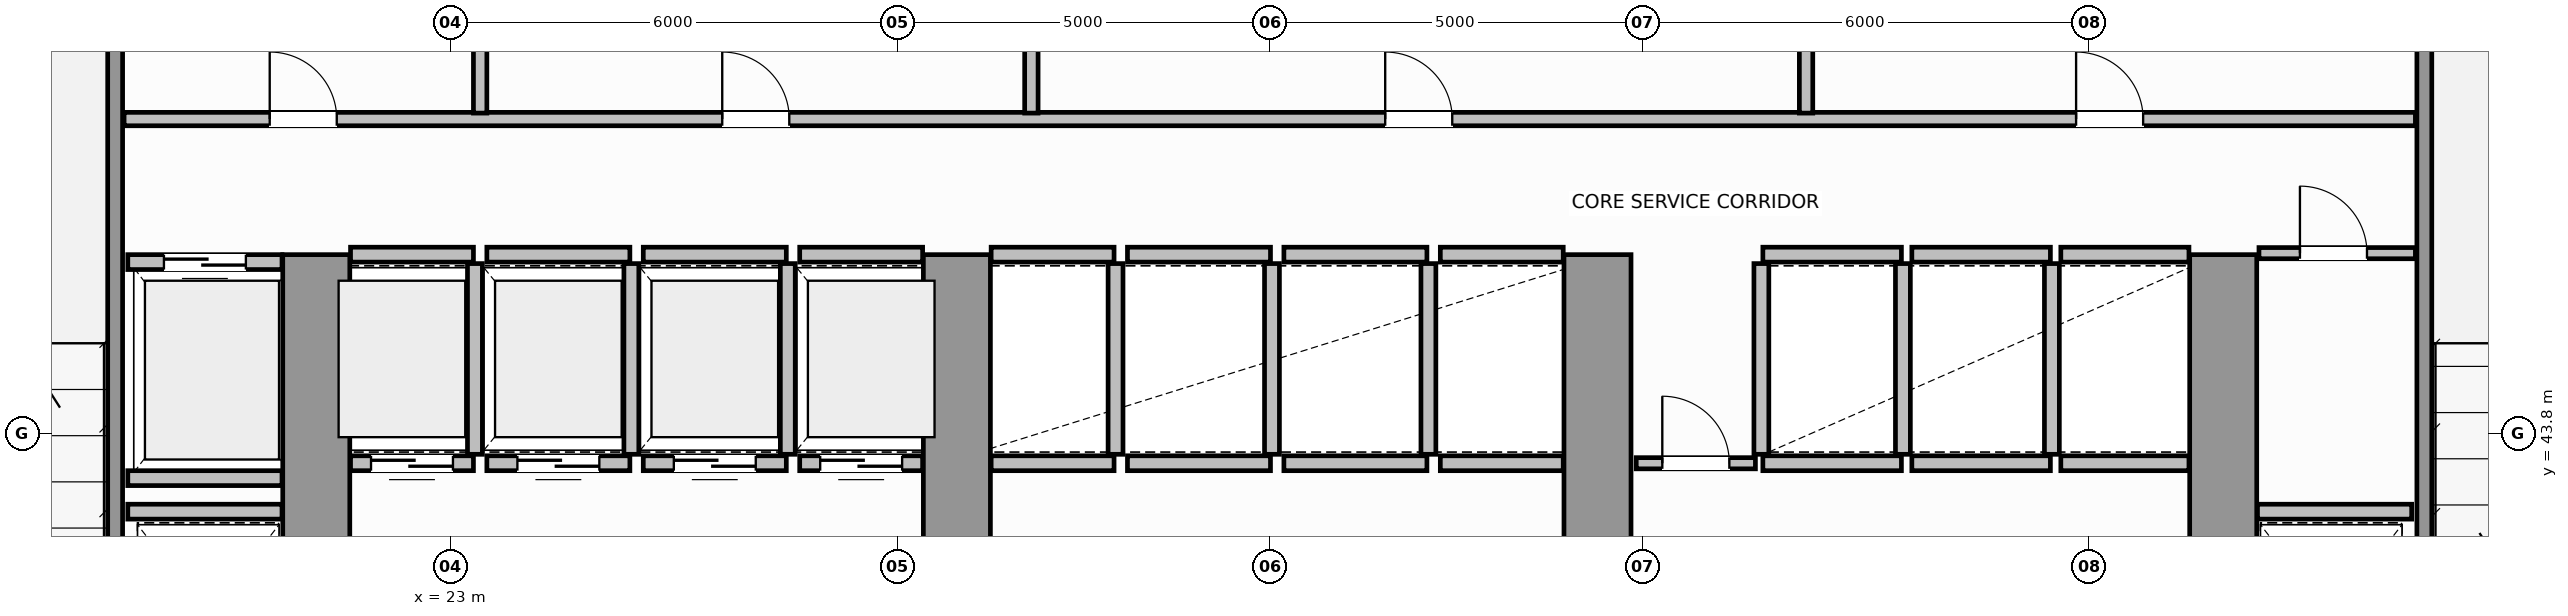
"""IFC4 building model, lengths in metres.
Left out: names, types, materials, properties, quantities, classifications, styles, units other than length and angle.
Written with IfcOpenShell. Run it as: python <this file> out.ifc"""

import sys

from ifc_helpers import new_model, si_unit, direction, frame, frame_2d, origin, place, context, subcontext, project, spatial, rectangle, extrude, source, transform, mapped, element, fill, save


model = new_model("IFC4")
c1 = context("Model", 3, precision=1e-05, world=origin(), true_north=direction((0.0, 1.0)))
c2 = subcontext(c1, "Body", "Model", "MODEL_VIEW")
j1 = project(units=[si_unit("LENGTHUNIT", "METRE"), si_unit("PLANEANGLEUNIT", "RADIAN")], contexts=[c1])
p1 = place(None, origin())
s1 = spatial("IfcSite", under=j1, at=p1, CompositionType="ELEMENT")
p2 = place(p1, origin())
s2 = spatial("IfcBuilding", under=s1, at=p2, CompositionType="ELEMENT")
p3 = place(p2, frame((0.0, 0.0, 68.2)))
s3 = spatial("IfcBuildingStorey", under=s2, at=p3, CompositionType="ELEMENT", Elevation=68.2)
for number, where, z_axis, x_axis in (
    (1, (21.2, 36.97, 0.0), (0.0, 0.0, 1.0), (0.0, 1.0, 0.0)),
    (2, (29.8, 36.97, 0.0), (0.0, 0.0, 1.0), (0.0, 1.0, 0.0)),
    (3, (38.4, 36.97, 0.0), (0.0, 0.0, 1.0), (0.0, 1.0, 0.0)),
    (4, (46.8, 36.97, 0.0), (0.0, 0.0, 1.0), (0.0, 1.0, 0.0)),
):
    element("IfcWall", number, at=place(p3, frame(where, z_axis=z_axis, x_axis=x_axis)), inside=s3, PredefinedType="SHEAR", context=c2, shape_type="SweptSolid", body=[
        extrude(rectangle(XDim=9.23, YDim=0.9, at=frame_2d((4.615, 0.0))), origin(), (0.0, 0.0, 1.0), 3.8),
    ])
for number, where, z_axis, x_axis in (
    (5, (18.5, 39.96, 0.0), (0.0, 0.0, 1.0), (0.0, 1.0, 0.0)),
    (6, (49.5, 39.96, 0.0), (0.0, 0.0, 1.0), (0.0, 1.0, 0.0)),
):
    element("IfcWall", number, at=place(p3, frame(where, z_axis=z_axis, x_axis=x_axis)), inside=s3, PredefinedType="SOLIDWALL", context=c2, shape_type="SweptSolid", body=[
        extrude(rectangle(XDim=9.93, YDim=0.2, at=frame_2d((4.965, 0.0))), origin(), (0.0, 0.0, 1.0), 3.8),
    ])
p4 = place(p3, frame((21.66, 43.4, 0.0), z_axis=(0.0, 0.0, 1.0), x_axis=(1.0, 0.0, 0.0)))
e7 = element("IfcWall", 7, at=p4, inside=s3, PredefinedType="SOLIDWALL", context=c2, shape_type="SweptSolid", body=[
    extrude(rectangle(XDim=1.65, YDim=0.2, at=frame_2d((0.825, 0.0))), origin(), (0.0, 0.0, 1.0), 3.58),
])
p5 = place(p4, frame((0.275, 0.0, 0.0)))
e8 = element("IfcOpeningElement", 8, at=p5, cuts=e7, PredefinedType="OPENING", context=c2, shape_type="SweptSolid", body=[
    extrude(rectangle(XDim=1.1, YDim=2.15, at=frame_2d((0.55, 1.075))), frame((0.0, 0.11, 0.0), z_axis=(0.0, -1.0, 0.0), x_axis=(1.0, 0.0, 0.0)), (0.0, 0.0, 1.0), 0.22),
])
p6 = place(p3, frame((21.66, 46.2, 0.0), z_axis=(0.0, 0.0, 1.0), x_axis=(1.0, 0.0, 0.0)))
e9 = element("IfcWall", 9, at=p6, inside=s3, PredefinedType="SOLIDWALL", context=c2, shape_type="SweptSolid", body=[
    extrude(rectangle(XDim=1.65, YDim=0.2, at=frame_2d((0.825, 0.0))), origin(), (0.0, 0.0, 1.0), 3.58),
])
p7 = place(p3, frame((23.33, 43.52, 0.0), z_axis=(0.0, 0.0, 1.0), x_axis=(0.0, 1.0, 0.0)))
e10 = element("IfcWall", 10, at=p7, inside=s3, PredefinedType="SOLIDWALL", context=c2, shape_type="SweptSolid", body=[
    extrude(rectangle(XDim=2.56, YDim=0.2, at=frame_2d((1.28, 0.0))), origin(), (0.0, 0.0, 1.0), 3.58),
])
p8 = place(p3, frame((23.49, 43.4, 0.0), z_axis=(0.0, 0.0, 1.0), x_axis=(1.0, 0.0, 0.0)))
e11 = element("IfcWall", 11, at=p8, inside=s3, PredefinedType="SOLIDWALL", context=c2, shape_type="SweptSolid", body=[
    extrude(rectangle(XDim=1.92, YDim=0.2, at=frame_2d((0.96, 0.0))), origin(), (0.0, 0.0, 1.0), 3.58),
])
p9 = place(p8, frame((0.41, 0.0, 0.0)))
e12 = element("IfcOpeningElement", 12, at=p9, cuts=e11, PredefinedType="OPENING", context=c2, shape_type="SweptSolid", body=[
    extrude(rectangle(XDim=1.1, YDim=2.15, at=frame_2d((0.55, 1.075))), frame((0.0, 0.11, 0.0), z_axis=(0.0, -1.0, 0.0), x_axis=(1.0, 0.0, 0.0)), (0.0, 0.0, 1.0), 0.22),
])
p10 = place(p3, frame((23.49, 46.2, 0.0), z_axis=(0.0, 0.0, 1.0), x_axis=(1.0, 0.0, 0.0)))
e13 = element("IfcWall", 13, at=p10, inside=s3, PredefinedType="SOLIDWALL", context=c2, shape_type="SweptSolid", body=[
    extrude(rectangle(XDim=1.92, YDim=0.2, at=frame_2d((0.96, 0.0))), origin(), (0.0, 0.0, 1.0), 3.58),
])
p11 = place(p3, frame((25.43, 43.52, 0.0), z_axis=(0.0, 0.0, 1.0), x_axis=(0.0, 1.0, 0.0)))
e14 = element("IfcWall", 14, at=p11, inside=s3, PredefinedType="SOLIDWALL", context=c2, shape_type="SweptSolid", body=[
    extrude(rectangle(XDim=2.56, YDim=0.2, at=frame_2d((1.28, 0.0))), origin(), (0.0, 0.0, 1.0), 3.58),
])
p12 = place(p3, frame((25.59, 43.4, 0.0), z_axis=(0.0, 0.0, 1.0), x_axis=(1.0, 0.0, 0.0)))
e15 = element("IfcWall", 15, at=p12, inside=s3, PredefinedType="SOLIDWALL", context=c2, shape_type="SweptSolid", body=[
    extrude(rectangle(XDim=1.92, YDim=0.2, at=frame_2d((0.96, 0.0))), origin(), (0.0, 0.0, 1.0), 3.58),
])
p13 = place(p12, frame((0.41, 0.0, 0.0)))
e16 = element("IfcOpeningElement", 16, at=p13, cuts=e15, PredefinedType="OPENING", context=c2, shape_type="SweptSolid", body=[
    extrude(rectangle(XDim=1.1, YDim=2.15, at=frame_2d((0.55, 1.075))), frame((0.0, 0.11, 0.0), z_axis=(0.0, -1.0, 0.0), x_axis=(1.0, 0.0, 0.0)), (0.0, 0.0, 1.0), 0.22),
])
p14 = place(p3, frame((25.59, 46.2, 0.0), z_axis=(0.0, 0.0, 1.0), x_axis=(1.0, 0.0, 0.0)))
e17 = element("IfcWall", 17, at=p14, inside=s3, PredefinedType="SOLIDWALL", context=c2, shape_type="SweptSolid", body=[
    extrude(rectangle(XDim=1.92, YDim=0.2, at=frame_2d((0.96, 0.0))), origin(), (0.0, 0.0, 1.0), 3.58),
])
p15 = place(p3, frame((27.53, 43.52, 0.0), z_axis=(0.0, 0.0, 1.0), x_axis=(0.0, 1.0, 0.0)))
e18 = element("IfcWall", 18, at=p15, inside=s3, PredefinedType="SOLIDWALL", context=c2, shape_type="SweptSolid", body=[
    extrude(rectangle(XDim=2.56, YDim=0.2, at=frame_2d((1.28, 0.0))), origin(), (0.0, 0.0, 1.0), 3.58),
])
p16 = place(p3, frame((27.69, 43.4, 0.0), z_axis=(0.0, 0.0, 1.0), x_axis=(1.0, 0.0, 0.0)))
e19 = element("IfcWall", 19, at=p16, inside=s3, PredefinedType="SOLIDWALL", context=c2, shape_type="SweptSolid", body=[
    extrude(rectangle(XDim=1.65, YDim=0.2, at=frame_2d((0.825, 0.0))), origin(), (0.0, 0.0, 1.0), 3.58),
])
p17 = place(p16, frame((0.275, 0.0, 0.0)))
e20 = element("IfcOpeningElement", 20, at=p17, cuts=e19, PredefinedType="OPENING", context=c2, shape_type="SweptSolid", body=[
    extrude(rectangle(XDim=1.1, YDim=2.15, at=frame_2d((0.55, 1.075))), frame((0.0, 0.11, 0.0), z_axis=(0.0, -1.0, 0.0), x_axis=(1.0, 0.0, 0.0)), (0.0, 0.0, 1.0), 0.22),
])
p18 = place(p3, frame((27.69, 46.2, 0.0), z_axis=(0.0, 0.0, 1.0), x_axis=(1.0, 0.0, 0.0)))
e21 = element("IfcWall", 21, at=p18, inside=s3, PredefinedType="SOLIDWALL", context=c2, shape_type="SweptSolid", body=[
    extrude(rectangle(XDim=1.65, YDim=0.2, at=frame_2d((0.825, 0.0))), origin(), (0.0, 0.0, 1.0), 3.58),
])
for number, where, z_axis, x_axis in (
    (22, (30.26, 43.4, 0.0), (0.0, 0.0, 1.0), (1.0, 0.0, 0.0)),
    (23, (30.26, 46.2, 0.0), (0.0, 0.0, 1.0), (1.0, 0.0, 0.0)),
):
    element("IfcWall", number, at=place(p3, frame(where, z_axis=z_axis, x_axis=x_axis)), inside=s3, PredefinedType="SOLIDWALL", context=c2, shape_type="SweptSolid", body=[
        extrude(rectangle(XDim=1.65, YDim=0.2, at=frame_2d((0.825, 0.0))), origin(), (0.0, 0.0, 1.0), 3.58),
    ])
p19 = place(p3, frame((31.93, 43.52, 0.0), z_axis=(0.0, 0.0, 1.0), x_axis=(0.0, 1.0, 0.0)))
e24 = element("IfcWall", 24, at=p19, inside=s3, PredefinedType="SOLIDWALL", context=c2, shape_type="SweptSolid", body=[
    extrude(rectangle(XDim=2.56, YDim=0.2, at=frame_2d((1.28, 0.0))), origin(), (0.0, 0.0, 1.0), 3.58),
])
for number, where, z_axis, x_axis in (
    (25, (32.09, 43.4, 0.0), (0.0, 0.0, 1.0), (1.0, 0.0, 0.0)),
    (26, (32.09, 46.2, 0.0), (0.0, 0.0, 1.0), (1.0, 0.0, 0.0)),
):
    element("IfcWall", number, at=place(p3, frame(where, z_axis=z_axis, x_axis=x_axis)), inside=s3, PredefinedType="SOLIDWALL", context=c2, shape_type="SweptSolid", body=[
        extrude(rectangle(XDim=1.92, YDim=0.2, at=frame_2d((0.96, 0.0))), origin(), (0.0, 0.0, 1.0), 3.58),
    ])
p20 = place(p3, frame((34.03, 43.52, 0.0), z_axis=(0.0, 0.0, 1.0), x_axis=(0.0, 1.0, 0.0)))
e27 = element("IfcWall", 27, at=p20, inside=s3, PredefinedType="SOLIDWALL", context=c2, shape_type="SweptSolid", body=[
    extrude(rectangle(XDim=2.56, YDim=0.2, at=frame_2d((1.28, 0.0))), origin(), (0.0, 0.0, 1.0), 3.58),
])
for number, where, z_axis, x_axis in (
    (28, (34.19, 43.4, 0.0), (0.0, 0.0, 1.0), (1.0, 0.0, 0.0)),
    (29, (34.19, 46.2, 0.0), (0.0, 0.0, 1.0), (1.0, 0.0, 0.0)),
):
    element("IfcWall", number, at=place(p3, frame(where, z_axis=z_axis, x_axis=x_axis)), inside=s3, PredefinedType="SOLIDWALL", context=c2, shape_type="SweptSolid", body=[
        extrude(rectangle(XDim=1.92, YDim=0.2, at=frame_2d((0.96, 0.0))), origin(), (0.0, 0.0, 1.0), 3.58),
    ])
p21 = place(p3, frame((36.13, 43.52, 0.0), z_axis=(0.0, 0.0, 1.0), x_axis=(0.0, 1.0, 0.0)))
e30 = element("IfcWall", 30, at=p21, inside=s3, PredefinedType="SOLIDWALL", context=c2, shape_type="SweptSolid", body=[
    extrude(rectangle(XDim=2.56, YDim=0.2, at=frame_2d((1.28, 0.0))), origin(), (0.0, 0.0, 1.0), 3.58),
])
for number, where, z_axis, x_axis in (
    (31, (36.29, 43.4, 0.0), (0.0, 0.0, 1.0), (1.0, 0.0, 0.0)),
    (32, (36.29, 46.2, 0.0), (0.0, 0.0, 1.0), (1.0, 0.0, 0.0)),
):
    element("IfcWall", number, at=place(p3, frame(where, z_axis=z_axis, x_axis=x_axis)), inside=s3, PredefinedType="SOLIDWALL", context=c2, shape_type="SweptSolid", body=[
        extrude(rectangle(XDim=1.65, YDim=0.2, at=frame_2d((0.825, 0.0))), origin(), (0.0, 0.0, 1.0), 3.58),
    ])
for number, where, z_axis, x_axis in (
    (33, (40.62, 43.4, 0.0), (0.0, 0.0, 1.0), (1.0, 0.0, 0.0)),
    (34, (40.62, 46.2, 0.0), (0.0, 0.0, 1.0), (1.0, 0.0, 0.0)),
):
    element("IfcWall", number, at=place(p3, frame(where, z_axis=z_axis, x_axis=x_axis)), inside=s3, PredefinedType="SOLIDWALL", context=c2, shape_type="SweptSolid", body=[
        extrude(rectangle(XDim=1.86, YDim=0.2, at=frame_2d((0.93, 0.0))), origin(), (0.0, 0.0, 1.0), 3.58),
    ])
for number, where, z_axis, x_axis in (
    (35, (40.6, 43.52, 0.0), (0.0, 0.0, 1.0), (0.0, 1.0, 0.0)),
    (36, (42.5, 43.52, 0.0), (0.0, 0.0, 1.0), (0.0, 1.0, 0.0)),
):
    element("IfcWall", number, at=place(p3, frame(where, z_axis=z_axis, x_axis=x_axis)), inside=s3, PredefinedType="SOLIDWALL", context=c2, shape_type="SweptSolid", body=[
        extrude(rectangle(XDim=2.56, YDim=0.2, at=frame_2d((1.28, 0.0))), origin(), (0.0, 0.0, 1.0), 3.58),
    ])
for number, where, z_axis, x_axis in (
    (37, (42.62, 43.4, 0.0), (0.0, 0.0, 1.0), (1.0, 0.0, 0.0)),
    (38, (42.62, 46.2, 0.0), (0.0, 0.0, 1.0), (1.0, 0.0, 0.0)),
):
    element("IfcWall", number, at=place(p3, frame(where, z_axis=z_axis, x_axis=x_axis)), inside=s3, PredefinedType="SOLIDWALL", context=c2, shape_type="SweptSolid", body=[
        extrude(rectangle(XDim=1.86, YDim=0.2, at=frame_2d((0.93, 0.0))), origin(), (0.0, 0.0, 1.0), 3.58),
    ])
p22 = place(p3, frame((44.5, 43.52, 0.0), z_axis=(0.0, 0.0, 1.0), x_axis=(0.0, 1.0, 0.0)))
e39 = element("IfcWall", 39, at=p22, inside=s3, PredefinedType="SOLIDWALL", context=c2, shape_type="SweptSolid", body=[
    extrude(rectangle(XDim=2.56, YDim=0.2, at=frame_2d((1.28, 0.0))), origin(), (0.0, 0.0, 1.0), 3.58),
])
for number, where, z_axis, x_axis in (
    (40, (44.62, 43.4, 0.0), (0.0, 0.0, 1.0), (1.0, 0.0, 0.0)),
    (41, (44.62, 46.2, 0.0), (0.0, 0.0, 1.0), (1.0, 0.0, 0.0)),
):
    element("IfcWall", number, at=place(p3, frame(where, z_axis=z_axis, x_axis=x_axis)), inside=s3, PredefinedType="SOLIDWALL", context=c2, shape_type="SweptSolid", body=[
        extrude(rectangle(XDim=1.72, YDim=0.2, at=frame_2d((0.86, 0.0))), origin(), (0.0, 0.0, 1.0), 3.58),
    ])
p23 = place(p3, frame((18.67, 46.1, 0.0), z_axis=(0.0, 0.0, 1.0), x_axis=(1.0, 0.0, 0.0)))
e42 = element("IfcWall", 42, at=p23, inside=s3, PredefinedType="SOLIDWALL", context=c2, shape_type="SweptSolid", body=[
    extrude(rectangle(XDim=2.07, YDim=0.2, at=frame_2d((1.035, 0.0))), origin(), (0.0, 0.0, 1.0), 3.58),
])
p24 = place(p23, frame((0.485, 0.0, 0.0)))
e43 = element("IfcOpeningElement", 43, at=p24, cuts=e42, PredefinedType="OPENING", context=c2, shape_type="SweptSolid", body=[
    extrude(rectangle(XDim=1.1, YDim=2.15, at=frame_2d((0.55, 1.075))), frame((0.0, 0.11, 0.0), z_axis=(0.0, -1.0, 0.0), x_axis=(1.0, 0.0, 0.0)), (0.0, 0.0, 1.0), 0.22),
])
for number, where, z_axis, x_axis in (
    (44, (18.67, 43.2, 0.0), (0.0, 0.0, 1.0), (1.0, 0.0, 0.0)),
    (45, (18.67, 42.75, 0.0), (0.0, 0.0, 1.0), (1.0, 0.0, 0.0)),
    (46, (47.26, 42.75, 0.0), (0.0, 0.0, 1.0), (1.0, 0.0, 0.0)),
):
    element("IfcWall", number, at=place(p3, frame(where, z_axis=z_axis, x_axis=x_axis)), inside=s3, PredefinedType="SOLIDWALL", context=c2, shape_type="SweptSolid", body=[
        extrude(rectangle(XDim=2.07, YDim=0.2, at=frame_2d((1.035, 0.0))), origin(), (0.0, 0.0, 1.0), 3.58),
    ])
p25 = place(p3, frame((47.28, 46.22, 0.0), z_axis=(0.0, 0.0, 1.0), x_axis=(1.0, 0.0, 0.0)))
e47 = element("IfcWall", 47, at=p25, inside=s3, PredefinedType="PARTITIONING", context=c2, shape_type="SweptSolid", body=[
    extrude(rectangle(XDim=2.1, YDim=0.15, at=frame_2d((1.05, 0.0))), origin(), (0.0, 0.0, 1.0), 3.58),
])
p26 = place(p25, frame((0.55, 0.0, 0.0)))
e48 = element("IfcOpeningElement", 48, at=p26, cuts=e47, PredefinedType="OPENING", context=c2, shape_type="SweptSolid", body=[
    extrude(rectangle(XDim=0.9, YDim=2.1, at=frame_2d((0.45, 1.05))), frame((0.0, 0.085, 0.0), z_axis=(0.0, -1.0, 0.0), x_axis=(1.0, 0.0, 0.0)), (0.0, 0.0, 1.0), 0.17),
])
p27 = place(p3, frame((38.92, 43.4, 0.0), z_axis=(0.0, 0.0, 1.0), x_axis=(1.0, 0.0, 0.0)))
e49 = element("IfcWall", 49, at=p27, inside=s3, PredefinedType="PARTITIONING", context=c2, shape_type="SweptSolid", body=[
    extrude(rectangle(XDim=1.6, YDim=0.15, at=frame_2d((0.8, 0.0))), origin(), (0.0, 0.0, 1.0), 3.58),
])
p28 = place(p27, frame((0.35, 0.0, 0.0)))
e50 = element("IfcOpeningElement", 50, at=p28, cuts=e49, PredefinedType="OPENING", context=c2, shape_type="SweptSolid", body=[
    extrude(rectangle(XDim=0.9, YDim=2.1, at=frame_2d((0.45, 1.05))), frame((0.0, 0.085, 0.0), z_axis=(0.0, -1.0, 0.0), x_axis=(1.0, 0.0, 0.0)), (0.0, 0.0, 1.0), 0.17),
])
p29 = place(p3, frame((18.62, 48.02, 0.0), z_axis=(0.0, 0.0, 1.0), x_axis=(1.0, 0.0, 0.0)))
e51 = element("IfcWall", 51, at=p29, inside=s3, PredefinedType="PLUMBINGWALL", context=c2, shape_type="SweptSolid", body=[
    extrude(rectangle(XDim=30.76, YDim=0.18, at=frame_2d((15.38, 0.0))), origin(), (0.0, 0.0, 1.0), 3.58),
])
p30 = place(p29, frame((1.955, 0.0, 0.0)))
e52 = element("IfcOpeningElement", 52, at=p30, cuts=e51, PredefinedType="OPENING", context=c2, shape_type="SweptSolid", body=[
    extrude(rectangle(XDim=0.9, YDim=2.15, at=frame_2d((0.45, 1.075))), frame((0.0, 0.1, 0.0), z_axis=(0.0, -1.0, 0.0), x_axis=(1.0, 0.0, 0.0)), (0.0, 0.0, 1.0), 0.2),
])
p31 = place(p29, frame((8.03, 0.0, 0.0)))
e53 = element("IfcOpeningElement", 53, at=p31, cuts=e51, PredefinedType="OPENING", context=c2, shape_type="SweptSolid", body=[
    extrude(rectangle(XDim=0.9, YDim=2.15, at=frame_2d((0.45, 1.075))), frame((0.0, 0.1, 0.0), z_axis=(0.0, -1.0, 0.0), x_axis=(1.0, 0.0, 0.0)), (0.0, 0.0, 1.0), 0.2),
])
p32 = place(p29, frame((16.93, 0.0, 0.0)))
e54 = element("IfcOpeningElement", 54, at=p32, cuts=e51, PredefinedType="OPENING", context=c2, shape_type="SweptSolid", body=[
    extrude(rectangle(XDim=0.9, YDim=2.15, at=frame_2d((0.45, 1.075))), frame((0.0, 0.1, 0.0), z_axis=(0.0, -1.0, 0.0), x_axis=(1.0, 0.0, 0.0)), (0.0, 0.0, 1.0), 0.2),
])
p33 = place(p29, frame((26.205, 0.0, 0.0)))
e55 = element("IfcOpeningElement", 55, at=p33, cuts=e51, PredefinedType="OPENING", context=c2, shape_type="SweptSolid", body=[
    extrude(rectangle(XDim=0.9, YDim=2.15, at=frame_2d((0.45, 1.075))), frame((0.0, 0.1, 0.0), z_axis=(0.0, -1.0, 0.0), x_axis=(1.0, 0.0, 0.0)), (0.0, 0.0, 1.0), 0.2),
])
for number, where, z_axis, x_axis in (
    (56, (23.4, 48.1, 0.0), (0.0, 0.0, 1.0), (0.0, 1.0, 0.0)),
    (57, (30.8, 48.1, 0.0), (0.0, 0.0, 1.0), (0.0, 1.0, 0.0)),
    (58, (41.2, 48.1, 0.0), (0.0, 0.0, 1.0), (0.0, 1.0, 0.0)),
):
    element("IfcWall", number, at=place(p3, frame(where, z_axis=z_axis, x_axis=x_axis)), inside=s3, PredefinedType="PLUMBINGWALL", context=c2, shape_type="SweptSolid", body=[
        extrude(rectangle(XDim=1.98, YDim=0.18, at=frame_2d((0.99, 0.0))), origin(), (0.0, 0.0, 1.0), 3.58),
    ])
m1 = source(origin(), c2, "Body", "SweptSolid", [
    extrude(rectangle(XDim=1.1, YDim=2.15, at=frame_2d((0.55, 1.075))), frame((0.0, 0.025, 0.0), z_axis=(0.0, -1.0, 0.0), x_axis=(1.0, 0.0, 0.0)), (0.0, 0.0, 1.0), 0.05),
])
p34 = place(p5, origin())
e59 = element("IfcDoor", 59, at=p34, inside=s3, OperationType="DOUBLE_DOOR_SLIDING", PredefinedType="DOOR", context=c2, shape_type="MappedRepresentation", body=[
    mapped(m1, transform((0.0, 0.0, 0.0), scale=1.0)),
])
fill(e8, e59)
p35 = place(p9, origin())
e60 = element("IfcDoor", 60, at=p35, inside=s3, OperationType="DOUBLE_DOOR_SLIDING", PredefinedType="DOOR", context=c2, shape_type="MappedRepresentation", body=[
    mapped(m1, transform((0.0, 0.0, 0.0), scale=1.0)),
])
fill(e12, e60)
p36 = place(p13, origin())
e61 = element("IfcDoor", 61, at=p36, inside=s3, OperationType="DOUBLE_DOOR_SLIDING", PredefinedType="DOOR", context=c2, shape_type="MappedRepresentation", body=[
    mapped(m1, transform((0.0, 0.0, 0.0), scale=1.0)),
])
fill(e16, e61)
p37 = place(p17, origin())
e62 = element("IfcDoor", 62, at=p37, inside=s3, OperationType="DOUBLE_DOOR_SLIDING", PredefinedType="DOOR", context=c2, shape_type="MappedRepresentation", body=[
    mapped(m1, transform((0.0, 0.0, 0.0), scale=1.0)),
])
fill(e20, e62)
p38 = place(p24, origin())
e63 = element("IfcDoor", 63, at=p38, inside=s3, OperationType="DOUBLE_DOOR_SLIDING", PredefinedType="DOOR", context=c2, shape_type="MappedRepresentation", body=[
    mapped(m1, transform((0.0, 0.0, 0.0), scale=1.0)),
])
fill(e43, e63)
m2 = source(origin(), c2, "Body", "SweptSolid", [
    extrude(rectangle(XDim=0.9, YDim=2.1, at=frame_2d((0.45, 1.05))), frame((0.0, 0.025, 0.0), z_axis=(0.0, -1.0, 0.0), x_axis=(1.0, 0.0, 0.0)), (0.0, 0.0, 1.0), 0.05),
])
p39 = place(p26, origin())
e64 = element("IfcDoor", 64, at=p39, inside=s3, OperationType="SINGLE_SWING_RIGHT", PredefinedType="DOOR", context=c2, shape_type="MappedRepresentation", body=[
    mapped(m2, transform((0.0, 0.0, 0.0), scale=1.0)),
])
fill(e48, e64)
p40 = place(p28, origin())
e65 = element("IfcDoor", 65, at=p40, inside=s3, OperationType="SINGLE_SWING_LEFT", PredefinedType="DOOR", context=c2, shape_type="MappedRepresentation", body=[
    mapped(m2, transform((0.0, 0.0, 0.0), scale=1.0)),
])
fill(e50, e65)
m3 = source(origin(), c2, "Body", "SweptSolid", [
    extrude(rectangle(XDim=0.9, YDim=2.15, at=frame_2d((0.45, 1.075))), frame((0.0, 0.025, 0.0), z_axis=(0.0, -1.0, 0.0), x_axis=(1.0, 0.0, 0.0)), (0.0, 0.0, 1.0), 0.05),
])
p41 = place(p30, origin())
e66 = element("IfcDoor", 66, at=p41, inside=s3, OperationType="SINGLE_SWING_LEFT", PredefinedType="DOOR", context=c2, shape_type="MappedRepresentation", body=[
    mapped(m3, transform((0.0, 0.0, 0.0), scale=1.0)),
])
fill(e52, e66)
p42 = place(p31, origin())
e67 = element("IfcDoor", 67, at=p42, inside=s3, OperationType="SINGLE_SWING_RIGHT", PredefinedType="DOOR", context=c2, shape_type="MappedRepresentation", body=[
    mapped(m3, transform((0.0, 0.0, 0.0), scale=1.0)),
])
fill(e53, e67)
p43 = place(p32, origin())
e68 = element("IfcDoor", 68, at=p43, inside=s3, OperationType="SINGLE_SWING_LEFT", PredefinedType="DOOR", context=c2, shape_type="MappedRepresentation", body=[
    mapped(m3, transform((0.0, 0.0, 0.0), scale=1.0)),
])
fill(e54, e68)
p44 = place(p33, origin())
e69 = element("IfcDoor", 69, at=p44, inside=s3, OperationType="SINGLE_SWING_RIGHT", PredefinedType="DOOR", context=c2, shape_type="MappedRepresentation", body=[
    mapped(m3, transform((0.0, 0.0, 0.0), scale=1.0)),
])
fill(e55, e69)
save(model, sys.argv[1])
